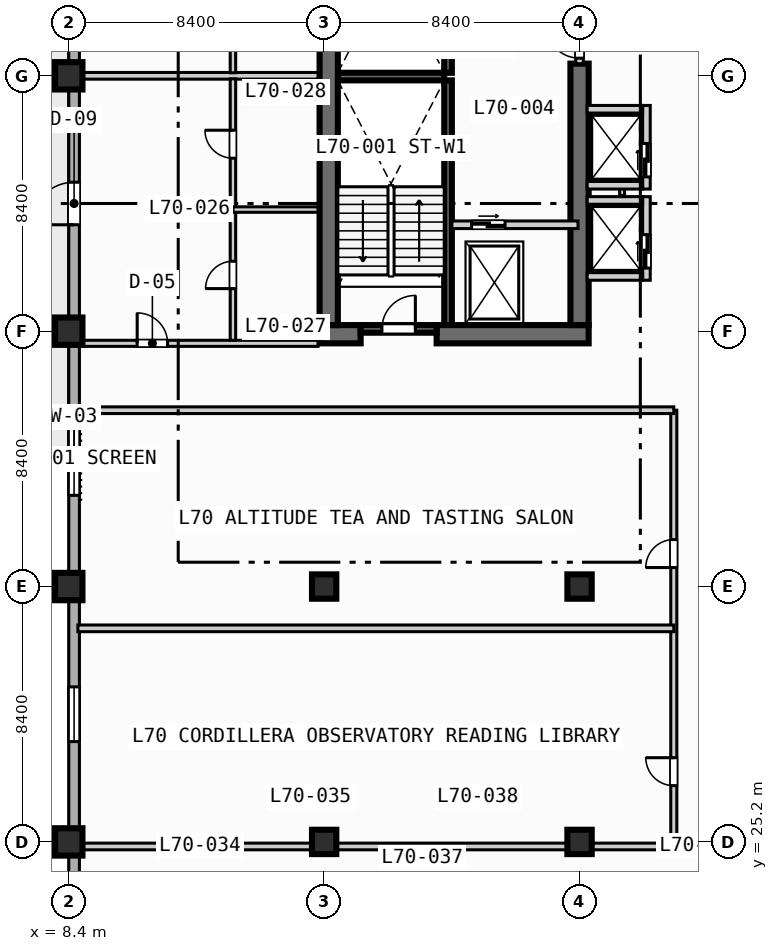
"""IFC4 building model, lengths in metres.
Left out: names, types, materials, properties, quantities, classifications, styles, units other than length and angle.
Written with IfcOpenShell. Run it as: python <this file> out.ifc"""

import sys

from ifc_helpers import new_model, si_unit, direction, frame, frame_2d, origin, origin_2d, place, context, subcontext, project, spatial, rectangle, extrude, element, fill, save


model = new_model("IFC4")
c1 = context("Model", 3, precision=1e-05, world=origin(), true_north=direction((0.0, 1.0)))
c2 = subcontext(c1, "Body", "Model", "MODEL_VIEW")
j1 = project(units=[si_unit("LENGTHUNIT", "METRE"), si_unit("PLANEANGLEUNIT", "RADIAN")], contexts=[c1])
p1 = place(None, origin())
s1 = spatial("IfcSite", under=j1, at=p1, CompositionType="ELEMENT")
p2 = place(p1, origin())
s2 = spatial("IfcBuilding", under=s1, at=p2, CompositionType="ELEMENT")
p3 = place(p2, frame((0.0, 0.0, 282.3)))
s3 = spatial("IfcBuildingStorey", under=s2, at=p3, CompositionType="ELEMENT", Elevation=282.3)
for number, where, z_axis, x_axis in (
    (1, (20.875, 42.2, 0.0), (0.0, 0.0, 1.0), (0.0, 1.0, 0.0)),
    (2, (20.875, 50.5, 0.0), (0.0, 0.0, 1.0), (0.0, 1.0, 0.0)),
):
    element("IfcWall", number, at=place(p3, frame(where, z_axis=z_axis, x_axis=x_axis)), inside=s3, PredefinedType="SOLIDWALL", context=c2, shape_type="SweptSolid", body=[
        extrude(rectangle(XDim=8.05, YDim=0.25, at=frame_2d((4.025, 0.0))), origin(), (0.0, 0.0, 1.0), 3.47),
    ])
p4 = place(p3, frame((17.25, 50.375, 0.0), z_axis=(0.0, 0.0, 1.0), x_axis=(1.0, 0.0, 0.0)))
e3 = element("IfcWall", 3, at=p4, inside=s3, PredefinedType="SOLIDWALL", context=c2, shape_type="SweptSolid", body=[
    extrude(rectangle(XDim=3.5, YDim=0.25, at=frame_2d((1.75, 0.0))), origin(), (0.0, 0.0, 1.0), 3.47),
])
p5 = place(p3, frame((16.65, 41.9, 0.0), z_axis=(0.0, 0.0, 1.0), x_axis=(1.0, 0.0, 0.0)))
e4 = element("IfcWall", 4, at=p5, inside=s3, PredefinedType="SHEAR", context=c2, shape_type="SweptSolid", body=[
    extrude(rectangle(XDim=1.35, YDim=0.6, at=frame_2d((0.675, 0.0))), origin(), (0.0, 0.0, 1.0), 3.47),
])
p6 = place(p3, frame((20.5, 41.9, 0.0), z_axis=(0.0, 0.0, 1.0), x_axis=(1.0, 0.0, 0.0)))
e5 = element("IfcWall", 5, at=p6, inside=s3, PredefinedType="SHEAR", context=c2, shape_type="SweptSolid", body=[
    extrude(rectangle(XDim=5.0, YDim=0.6, at=frame_2d((2.5, 0.0))), origin(), (0.0, 0.0, 1.0), 3.47),
])
p7 = place(p3, frame((16.95, 42.2, 0.0), z_axis=(0.0, 0.0, 1.0), x_axis=(0.0, 1.0, 0.0)))
e6 = element("IfcWall", 6, at=p7, inside=s3, PredefinedType="SHEAR", context=c2, shape_type="SweptSolid", body=[
    extrude(rectangle(XDim=16.35, YDim=0.6, at=frame_2d((8.175, 0.0))), origin(), (0.0, 0.0, 1.0), 3.47),
])
p8 = place(p3, frame((25.2, 42.2, 0.0), z_axis=(0.0, 0.0, 1.0), x_axis=(0.0, 1.0, 0.0)))
e7 = element("IfcWall", 7, at=p8, inside=s3, PredefinedType="SHEAR", context=c2, shape_type="SweptSolid", body=[
    extrude(rectangle(XDim=8.6, YDim=0.6, at=frame_2d((4.3, 0.0))), origin(), (0.0, 0.0, 1.0), 3.47),
])
for number, where, z_axis, x_axis in (
    (8, (8.4, 25.2, 0.0), (0.0, 0.0, 1.0), (1.0, 0.0, 0.0)),
    (9, (8.4, 33.6, 0.0), (0.0, 0.0, 1.0), (1.0, 0.0, 0.0)),
    (10, (8.4, 42.0, 0.0), (0.0, 0.0, 1.0), (1.0, 0.0, 0.0)),
    (11, (8.4, 50.4, 0.0), (0.0, 0.0, 1.0), (1.0, 0.0, 0.0)),
):
    element("IfcColumn", number, at=place(p3, frame(where, z_axis=z_axis, x_axis=x_axis)), inside=s3, PredefinedType="COLUMN", context=c2, shape_type="SweptSolid", body=[
        extrude(rectangle(XDim=0.9, YDim=0.9, at=origin_2d()), origin(), (0.0, 0.0, 1.0), 3.7),
    ])
for number, where, z_axis, x_axis in (
    (12, (16.8, 25.2, 0.0), (0.0, 0.0, 1.0), (1.0, 0.0, 0.0)),
    (13, (16.8, 33.6, 0.0), (0.0, 0.0, 1.0), (1.0, 0.0, 0.0)),
    (14, (25.2, 25.2, 0.0), (0.0, 0.0, 1.0), (1.0, 0.0, 0.0)),
    (15, (25.2, 33.6, 0.0), (0.0, 0.0, 1.0), (1.0, 0.0, 0.0)),
):
    element("IfcColumn", number, at=place(p3, frame(where, z_axis=z_axis, x_axis=x_axis)), inside=s3, PredefinedType="COLUMN", context=c2, shape_type="SweptSolid", body=[
        extrude(rectangle(XDim=0.8, YDim=0.8, at=origin_2d()), origin(), (0.0, 0.0, 1.0), 3.7),
    ])
p9 = place(p3, frame((8.575, 11.575, 0.0), z_axis=(0.0, 0.0, 1.0), x_axis=(0.0, 1.0, 0.0)))
e16 = element("IfcWall", 16, at=p9, inside=s3, PredefinedType="STANDARD", context=c2, shape_type="SweptSolid", body=[
    extrude(rectangle(XDim=60.85, YDim=0.35, at=frame_2d((30.425, 0.0))), origin(), (0.0, 0.0, 1.0), 3.47),
])
p10 = place(p9, frame((33.925, 0.0, 0.0)))
e17 = element("IfcOpeningElement", 17, at=p10, cuts=e16, PredefinedType="OPENING", context=c2, shape_type="SweptSolid", body=[
    extrude(rectangle(XDim=1.4, YDim=2.2, at=frame_2d((0.7, 1.1))), frame((0.0, 0.185, 0.0), z_axis=(0.0, -1.0, 0.0), x_axis=(1.0, 0.0, 0.0)), (0.0, 0.0, 1.0), 0.37),
])
p11 = place(p9, frame((16.925, 0.0, 0.85)))
e18 = element("IfcOpeningElement", 18, at=p11, cuts=e16, PredefinedType="OPENING", context=c2, shape_type="SweptSolid", body=[
    extrude(rectangle(XDim=1.8, YDim=1.8, at=frame_2d((0.9, 0.9))), frame((0.0, 0.185, 0.0), z_axis=(0.0, -1.0, 0.0), x_axis=(1.0, 0.0, 0.0)), (0.0, 0.0, 1.0), 0.37),
])
p12 = place(p9, frame((25.025, 0.0, 0.85)))
e19 = element("IfcOpeningElement", 19, at=p12, cuts=e16, PredefinedType="OPENING", context=c2, shape_type="SweptSolid", body=[
    extrude(rectangle(XDim=2.4, YDim=1.95, at=frame_2d((1.2, 0.975))), frame((0.0, 0.185, 0.0), z_axis=(0.0, -1.0, 0.0), x_axis=(1.0, 0.0, 0.0)), (0.0, 0.0, 1.0), 0.37),
])
p13 = place(p9, frame((41.825, 0.0, 0.85)))
e20 = element("IfcOpeningElement", 20, at=p13, cuts=e16, PredefinedType="OPENING", context=c2, shape_type="SweptSolid", body=[
    extrude(rectangle(XDim=2.4, YDim=1.95, at=frame_2d((1.2, 0.975))), frame((0.0, 0.185, 0.0), z_axis=(0.0, -1.0, 0.0), x_axis=(1.0, 0.0, 0.0)), (0.0, 0.0, 1.0), 0.37),
])
p14 = place(p3, frame((18.0, 42.075, 0.0), z_axis=(0.0, 0.0, 1.0), x_axis=(1.0, 0.0, 0.0)))
e21 = element("IfcWall", 21, at=p14, inside=s3, PredefinedType="SOLIDWALL", context=c2, shape_type="SweptSolid", body=[
    extrude(rectangle(XDim=2.5, YDim=0.25, at=frame_2d((1.25, 0.0))), origin(), (0.0, 0.0, 1.0), 3.47),
])
p15 = place(p14, frame((0.7, 0.0, 0.0)))
e22 = element("IfcOpeningElement", 22, at=p15, cuts=e21, PredefinedType="OPENING", context=c2, shape_type="SweptSolid", body=[
    extrude(rectangle(XDim=1.1, YDim=2.15, at=frame_2d((0.55, 1.075))), frame((0.0, 0.135, 0.0), z_axis=(0.0, -1.0, 0.0), x_axis=(1.0, 0.0, 0.0)), (0.0, 0.0, 1.0), 0.27),
])
p16 = place(p3, frame((21.0, 45.5, 0.0), z_axis=(0.0, 0.0, 1.0), x_axis=(1.0, 0.0, 0.0)))
e23 = element("IfcWall", 23, at=p16, inside=s3, PredefinedType="SOLIDWALL", context=c2, shape_type="SweptSolid", body=[
    extrude(rectangle(XDim=4.15, YDim=0.25, at=frame_2d((2.075, 0.0))), origin(), (0.0, 0.0, 1.0), 3.47),
])
p17 = place(p16, frame((0.65, 0.0, 0.0)))
e24 = element("IfcOpeningElement", 24, at=p17, cuts=e23, PredefinedType="OPENING", context=c2, shape_type="SweptSolid", body=[
    extrude(rectangle(XDim=1.1, YDim=2.15, at=frame_2d((0.55, 1.075))), frame((0.0, 0.135, 0.0), z_axis=(0.0, -1.0, 0.0), x_axis=(1.0, 0.0, 0.0)), (0.0, 0.0, 1.0), 0.27),
])
p18 = place(p3, frame((25.2, 50.8, 0.0), z_axis=(0.0, 0.0, 1.0), x_axis=(0.0, 1.0, 0.0)))
e25 = element("IfcWall", 25, at=p18, inside=s3, PredefinedType="SOLIDWALL", context=c2, shape_type="SweptSolid", body=[
    extrude(rectangle(XDim=1.48, YDim=0.25, at=frame_2d((0.74, 0.0))), origin(), (0.0, 0.0, 1.0), 3.47),
])
p19 = place(p18, frame((0.18, 0.0, 0.0)))
e26 = element("IfcOpeningElement", 26, at=p19, cuts=e25, PredefinedType="OPENING", context=c2, shape_type="SweptSolid", body=[
    extrude(rectangle(XDim=1.1, YDim=2.15, at=frame_2d((0.55, 1.075))), frame((0.0, 0.135, 0.0), z_axis=(0.0, -1.0, 0.0), x_axis=(1.0, 0.0, 0.0)), (0.0, 0.0, 1.0), 0.27),
])
p20 = place(p3, frame((27.4, 43.675, 0.0), z_axis=(0.0, 0.0, 1.0), x_axis=(0.0, 1.0, 0.0)))
e27 = element("IfcWall", 27, at=p20, inside=s3, PredefinedType="SOLIDWALL", context=c2, shape_type="SweptSolid", body=[
    extrude(rectangle(XDim=2.75, YDim=0.25, at=frame_2d((1.375, 0.0))), origin(), (0.0, 0.0, 1.0), 3.47),
])
p21 = place(p20, frame((0.4, 0.0, 0.0)))
e28 = element("IfcOpeningElement", 28, at=p21, cuts=e27, PredefinedType="OPENING", context=c2, shape_type="SweptSolid", body=[
    extrude(rectangle(XDim=1.1, YDim=2.15, at=frame_2d((0.55, 1.075))), frame((0.0, 0.135, 0.0), z_axis=(0.0, -1.0, 0.0), x_axis=(1.0, 0.0, 0.0)), (0.0, 0.0, 1.0), 0.27),
])
for number, where, z_axis, x_axis in (
    (29, (25.45, 43.8, 0.0), (0.0, 0.0, 1.0), (1.0, 0.0, 0.0)),
    (30, (25.45, 46.3, 0.0), (0.0, 0.0, 1.0), (1.0, 0.0, 0.0)),
):
    element("IfcWall", number, at=place(p3, frame(where, z_axis=z_axis, x_axis=x_axis)), inside=s3, PredefinedType="SOLIDWALL", context=c2, shape_type="SweptSolid", body=[
        extrude(rectangle(XDim=1.825, YDim=0.25, at=frame_2d((0.913, 0.0))), origin(), (0.0, 0.0, 1.0), 3.47),
    ])
p22 = place(p3, frame((26.6, 46.46, 0.0), z_axis=(0.0, 0.0, 1.0), x_axis=(0.0, 1.0, 0.0)))
e31 = element("IfcWall", 31, at=p22, inside=s3, PredefinedType="PARTITIONING", context=c2, shape_type="SweptSolid", body=[
    extrude(rectangle(XDim=0.88, YDim=0.16, at=frame_2d((0.44, 0.0))), origin(), (0.0, 0.0, 1.0), 3.47),
])
p23 = place(p3, frame((27.4, 46.675, 0.0), z_axis=(0.0, 0.0, 1.0), x_axis=(0.0, 1.0, 0.0)))
e32 = element("IfcWall", 32, at=p23, inside=s3, PredefinedType="SOLIDWALL", context=c2, shape_type="SweptSolid", body=[
    extrude(rectangle(XDim=2.75, YDim=0.25, at=frame_2d((1.375, 0.0))), origin(), (0.0, 0.0, 1.0), 3.47),
])
p24 = place(p23, frame((0.4, 0.0, 0.0)))
e33 = element("IfcOpeningElement", 33, at=p24, cuts=e32, PredefinedType="OPENING", context=c2, shape_type="SweptSolid", body=[
    extrude(rectangle(XDim=1.1, YDim=2.15, at=frame_2d((0.55, 1.075))), frame((0.0, 0.135, 0.0), z_axis=(0.0, -1.0, 0.0), x_axis=(1.0, 0.0, 0.0)), (0.0, 0.0, 1.0), 0.27),
])
for number, where, z_axis, x_axis in (
    (34, (25.45, 46.8, 0.0), (0.0, 0.0, 1.0), (1.0, 0.0, 0.0)),
    (35, (25.45, 49.3, 0.0), (0.0, 0.0, 1.0), (1.0, 0.0, 0.0)),
):
    element("IfcWall", number, at=place(p3, frame(where, z_axis=z_axis, x_axis=x_axis)), inside=s3, PredefinedType="SOLIDWALL", context=c2, shape_type="SweptSolid", body=[
        extrude(rectangle(XDim=1.825, YDim=0.25, at=frame_2d((0.913, 0.0))), origin(), (0.0, 0.0, 1.0), 3.47),
    ])
p25 = place(p3, frame((8.65, 41.6, 0.0), z_axis=(0.0, 0.0, 1.0), x_axis=(1.0, 0.0, 0.0)))
e36 = element("IfcWall", 36, at=p25, inside=s3, PredefinedType="PARTITIONING", context=c2, shape_type="SweptSolid", body=[
    extrude(rectangle(XDim=7.95, YDim=0.2, at=frame_2d((3.975, 0.0))), origin(), (0.0, 0.0, 1.0), 3.47),
])
p26 = place(p25, frame((2.0, 0.0, 0.0)))
e37 = element("IfcOpeningElement", 37, at=p26, cuts=e36, PredefinedType="OPENING", context=c2, shape_type="SweptSolid", body=[
    extrude(rectangle(XDim=1.0, YDim=2.15, at=frame_2d((0.5, 1.075))), frame((0.0, 0.11, 0.0), z_axis=(0.0, -1.0, 0.0), x_axis=(1.0, 0.0, 0.0)), (0.0, 0.0, 1.0), 0.22),
])
p27 = place(p3, frame((8.65, 50.4, 0.0), z_axis=(0.0, 0.0, 1.0), x_axis=(1.0, 0.0, 0.0)))
e38 = element("IfcWall", 38, at=p27, inside=s3, PredefinedType="PARTITIONING", context=c2, shape_type="SweptSolid", body=[
    extrude(rectangle(XDim=7.95, YDim=0.22, at=frame_2d((3.975, 0.0))), origin(), (0.0, 0.0, 1.0), 3.16),
])
p28 = place(p3, frame((13.8, 41.7, 0.0), z_axis=(0.0, 0.0, 1.0), x_axis=(0.0, 1.0, 0.0)))
e39 = element("IfcWall", 39, at=p28, inside=s3, PredefinedType="PLUMBINGWALL", context=c2, shape_type="SweptSolid", body=[
    extrude(rectangle(XDim=8.6, YDim=0.18, at=frame_2d((4.3, 0.0))), origin(), (0.0, 0.0, 1.0), 3.47),
])
p29 = place(p28, frame((1.7, 0.0, 0.0)))
e40 = element("IfcOpeningElement", 40, at=p29, cuts=e39, PredefinedType="OPENING", context=c2, shape_type="SweptSolid", body=[
    extrude(rectangle(XDim=0.9, YDim=2.1, at=frame_2d((0.45, 1.05))), frame((0.0, 0.1, 0.0), z_axis=(0.0, -1.0, 0.0), x_axis=(1.0, 0.0, 0.0)), (0.0, 0.0, 1.0), 0.2),
])
p30 = place(p28, frame((5.99, 0.0, 0.0)))
e41 = element("IfcOpeningElement", 41, at=p30, cuts=e39, PredefinedType="OPENING", context=c2, shape_type="SweptSolid", body=[
    extrude(rectangle(XDim=0.92, YDim=2.1, at=frame_2d((0.46, 1.05))), frame((0.0, 0.1, 0.0), z_axis=(0.0, -1.0, 0.0), x_axis=(1.0, 0.0, 0.0)), (0.0, 0.0, 1.0), 0.2),
])
p31 = place(p3, frame((13.8, 46.0, 0.0), z_axis=(0.0, 0.0, 1.0), x_axis=(1.0, 0.0, 0.0)))
e42 = element("IfcWall", 42, at=p31, inside=s3, PredefinedType="PLUMBINGWALL", context=c2, shape_type="SweptSolid", body=[
    extrude(rectangle(XDim=2.8, YDim=0.18, at=frame_2d((1.4, 0.0))), origin(), (0.0, 0.0, 1.0), 3.47),
])
p32 = place(p3, frame((13.8, 50.5, 0.0), z_axis=(0.0, 0.0, 1.0), x_axis=(0.0, 1.0, 0.0)))
e43 = element("IfcWall", 43, at=p32, inside=s3, PredefinedType="PLUMBINGWALL", context=c2, shape_type="SweptSolid", body=[
    extrude(rectangle(XDim=8.4, YDim=0.18, at=frame_2d((4.2, 0.0))), origin(), (0.0, 0.0, 1.0), 3.47),
])
p33 = place(p32, frame((1.65, 0.0, 0.0)))
e44 = element("IfcOpeningElement", 44, at=p33, cuts=e43, PredefinedType="OPENING", context=c2, shape_type="SweptSolid", body=[
    extrude(rectangle(XDim=0.9, YDim=2.1, at=frame_2d((0.45, 1.05))), frame((0.0, 0.1, 0.0), z_axis=(0.0, -1.0, 0.0), x_axis=(1.0, 0.0, 0.0)), (0.0, 0.0, 1.0), 0.2),
])
p34 = place(p32, frame((5.84, 0.0, 0.0)))
e45 = element("IfcOpeningElement", 45, at=p34, cuts=e43, PredefinedType="OPENING", context=c2, shape_type="SweptSolid", body=[
    extrude(rectangle(XDim=0.92, YDim=2.1, at=frame_2d((0.46, 1.05))), frame((0.0, 0.1, 0.0), z_axis=(0.0, -1.0, 0.0), x_axis=(1.0, 0.0, 0.0)), (0.0, 0.0, 1.0), 0.2),
])
p35 = place(p3, frame((28.3, 25.05, 0.0), z_axis=(0.0, 0.0, 1.0), x_axis=(0.0, 1.0, 0.0)))
e46 = element("IfcWall", 46, at=p35, inside=s3, PredefinedType="PARTITIONING", context=c2, shape_type="SweptSolid", body=[
    extrude(rectangle(XDim=14.35, YDim=0.2, at=frame_2d((7.175, 0.0))), origin(), (0.0, 0.0, 1.0), 3.47),
])
p36 = place(p35, frame((2.0, 0.0, 0.0)))
e47 = element("IfcOpeningElement", 47, at=p36, cuts=e46, PredefinedType="OPENING", context=c2, shape_type="SweptSolid", body=[
    extrude(rectangle(XDim=0.92, YDim=2.1, at=frame_2d((0.46, 1.05))), frame((0.0, 0.11, 0.0), z_axis=(0.0, -1.0, 0.0), x_axis=(1.0, 0.0, 0.0)), (0.0, 0.0, 1.0), 0.22),
])
p37 = place(p35, frame((9.175, 0.0, 0.0)))
e48 = element("IfcOpeningElement", 48, at=p37, cuts=e46, PredefinedType="OPENING", context=c2, shape_type="SweptSolid", body=[
    extrude(rectangle(XDim=0.92, YDim=2.1, at=frame_2d((0.46, 1.05))), frame((0.0, 0.11, 0.0), z_axis=(0.0, -1.0, 0.0), x_axis=(1.0, 0.0, 0.0)), (0.0, 0.0, 1.0), 0.22),
])
p38 = place(p3, frame((8.7, 25.05, 0.0), z_axis=(0.0, 0.0, 1.0), x_axis=(1.0, 0.0, 0.0)))
e49 = element("IfcWall", 49, at=p38, inside=s3, PredefinedType="PARTITIONING", context=c2, shape_type="SweptSolid", body=[
    extrude(rectangle(XDim=19.6, YDim=0.22, at=frame_2d((9.8, 0.0))), origin(), (0.0, 0.0, 1.0), 2.87),
])
for number, where, z_axis, x_axis in (
    (50, (8.7, 32.225, 0.0), (0.0, 0.0, 1.0), (1.0, 0.0, 0.0)),
    (51, (8.7, 39.4, 0.0), (0.0, 0.0, 1.0), (1.0, 0.0, 0.0)),
):
    element("IfcWall", number, at=place(p3, frame(where, z_axis=z_axis, x_axis=x_axis)), inside=s3, PredefinedType="PARTITIONING", context=c2, shape_type="SweptSolid", body=[
        extrude(rectangle(XDim=19.6, YDim=0.22, at=frame_2d((9.8, 0.0))), origin(), (0.0, 0.0, 1.0), 3.47),
    ])
p39 = place(p10, origin())
e52 = element("IfcDoor", 52, at=p39, inside=s3, OperationType="SINGLE_SWING_LEFT", PredefinedType="DOOR", context=c2, shape_type="SweptSolid", body=[
    extrude(rectangle(XDim=1.4, YDim=2.2, at=frame_2d((0.7, 1.1))), frame((0.0, 0.025, 0.0), z_axis=(0.0, -1.0, 0.0), x_axis=(1.0, 0.0, 0.0)), (0.0, 0.0, 1.0), 0.05),
])
fill(e17, e52)
p40 = place(p11, origin())
e53 = element("IfcWindow", 53, at=p40, inside=s3, PartitioningType="SINGLE_PANEL", PredefinedType="WINDOW", context=c2, shape_type="SweptSolid", body=[
    extrude(rectangle(XDim=1.8, YDim=1.8, at=frame_2d((0.9, 0.9))), frame((0.0, 0.03, 0.0), z_axis=(0.0, -1.0, 0.0), x_axis=(1.0, 0.0, 0.0)), (0.0, 0.0, 1.0), 0.06),
])
fill(e18, e53)
p41 = place(p12, origin())
e54 = element("IfcWindow", 54, at=p41, inside=s3, PartitioningType="SINGLE_PANEL", PredefinedType="WINDOW", context=c2, shape_type="SweptSolid", body=[
    extrude(rectangle(XDim=2.4, YDim=1.95, at=frame_2d((1.2, 0.975))), frame((0.0, 0.03, 0.0), z_axis=(0.0, -1.0, 0.0), x_axis=(1.0, 0.0, 0.0)), (0.0, 0.0, 1.0), 0.06),
])
fill(e19, e54)
p42 = place(p15, origin())
e55 = element("IfcDoor", 55, at=p42, inside=s3, OperationType="SINGLE_SWING_RIGHT", PredefinedType="DOOR", context=c2, shape_type="SweptSolid", body=[
    extrude(rectangle(XDim=1.1, YDim=2.15, at=frame_2d((0.55, 1.075))), frame((0.0, 0.025, 0.0), z_axis=(0.0, -1.0, 0.0), x_axis=(1.0, 0.0, 0.0)), (0.0, 0.0, 1.0), 0.05),
])
fill(e22, e55)
p43 = place(p17, origin())
e56 = element("IfcDoor", 56, at=p43, inside=s3, OperationType="SLIDING_TO_LEFT", PredefinedType="DOOR", context=c2, shape_type="SweptSolid", body=[
    extrude(rectangle(XDim=1.1, YDim=2.15, at=frame_2d((0.55, 1.075))), frame((0.0, 0.025, 0.0), z_axis=(0.0, -1.0, 0.0), x_axis=(1.0, 0.0, 0.0)), (0.0, 0.0, 1.0), 0.05),
])
fill(e24, e56)
p44 = place(p19, origin())
e57 = element("IfcDoor", 57, at=p44, inside=s3, OperationType="SINGLE_SWING_RIGHT", PredefinedType="DOOR", context=c2, shape_type="SweptSolid", body=[
    extrude(rectangle(XDim=1.1, YDim=2.15, at=frame_2d((0.55, 1.075))), frame((0.0, 0.025, 0.0), z_axis=(0.0, -1.0, 0.0), x_axis=(1.0, 0.0, 0.0)), (0.0, 0.0, 1.0), 0.05),
])
fill(e26, e57)
p45 = place(p21, origin())
e58 = element("IfcDoor", 58, at=p45, inside=s3, OperationType="SLIDING_TO_LEFT", PredefinedType="DOOR", context=c2, shape_type="SweptSolid", body=[
    extrude(rectangle(XDim=1.1, YDim=2.15, at=frame_2d((0.55, 1.075))), frame((0.0, 0.025, 0.0), z_axis=(0.0, -1.0, 0.0), x_axis=(1.0, 0.0, 0.0)), (0.0, 0.0, 1.0), 0.05),
])
fill(e28, e58)
p46 = place(p24, origin())
e59 = element("IfcDoor", 59, at=p46, inside=s3, OperationType="SLIDING_TO_LEFT", PredefinedType="DOOR", context=c2, shape_type="SweptSolid", body=[
    extrude(rectangle(XDim=1.1, YDim=2.15, at=frame_2d((0.55, 1.075))), frame((0.0, 0.025, 0.0), z_axis=(0.0, -1.0, 0.0), x_axis=(1.0, 0.0, 0.0)), (0.0, 0.0, 1.0), 0.05),
])
fill(e33, e59)
p47 = place(p26, origin())
e60 = element("IfcDoor", 60, at=p47, inside=s3, OperationType="SINGLE_SWING_LEFT", PredefinedType="DOOR", context=c2, shape_type="SweptSolid", body=[
    extrude(rectangle(XDim=1.0, YDim=2.15, at=frame_2d((0.5, 1.075))), frame((0.0, 0.025, 0.0), z_axis=(0.0, -1.0, 0.0), x_axis=(1.0, 0.0, 0.0)), (0.0, 0.0, 1.0), 0.05),
])
fill(e37, e60)
p48 = place(p29, origin())
e61 = element("IfcDoor", 61, at=p48, inside=s3, OperationType="SINGLE_SWING_LEFT", PredefinedType="DOOR", context=c2, shape_type="SweptSolid", body=[
    extrude(rectangle(XDim=0.9, YDim=2.1, at=frame_2d((0.45, 1.05))), frame((0.0, 0.025, 0.0), z_axis=(0.0, -1.0, 0.0), x_axis=(1.0, 0.0, 0.0)), (0.0, 0.0, 1.0), 0.05),
])
fill(e40, e61)
p49 = place(p30, origin())
e62 = element("IfcDoor", 62, at=p49, inside=s3, OperationType="SINGLE_SWING_RIGHT", PredefinedType="DOOR", context=c2, shape_type="SweptSolid", body=[
    extrude(rectangle(XDim=0.92, YDim=2.1, at=frame_2d((0.46, 1.05))), frame((0.0, 0.025, 0.0), z_axis=(0.0, -1.0, 0.0), x_axis=(1.0, 0.0, 0.0)), (0.0, 0.0, 1.0), 0.05),
])
fill(e41, e62)
p50 = place(p36, origin())
e63 = element("IfcDoor", 63, at=p50, inside=s3, OperationType="SINGLE_SWING_RIGHT", PredefinedType="DOOR", context=c2, shape_type="SweptSolid", body=[
    extrude(rectangle(XDim=0.92, YDim=2.1, at=frame_2d((0.46, 1.05))), frame((0.0, 0.025, 0.0), z_axis=(0.0, -1.0, 0.0), x_axis=(1.0, 0.0, 0.0)), (0.0, 0.0, 1.0), 0.05),
])
fill(e47, e63)
p51 = place(p37, origin())
e64 = element("IfcDoor", 64, at=p51, inside=s3, OperationType="SINGLE_SWING_LEFT", PredefinedType="DOOR", context=c2, shape_type="SweptSolid", body=[
    extrude(rectangle(XDim=0.92, YDim=2.1, at=frame_2d((0.46, 1.05))), frame((0.0, 0.025, 0.0), z_axis=(0.0, -1.0, 0.0), x_axis=(1.0, 0.0, 0.0)), (0.0, 0.0, 1.0), 0.05),
])
fill(e48, e64)
save(model, sys.argv[1])
